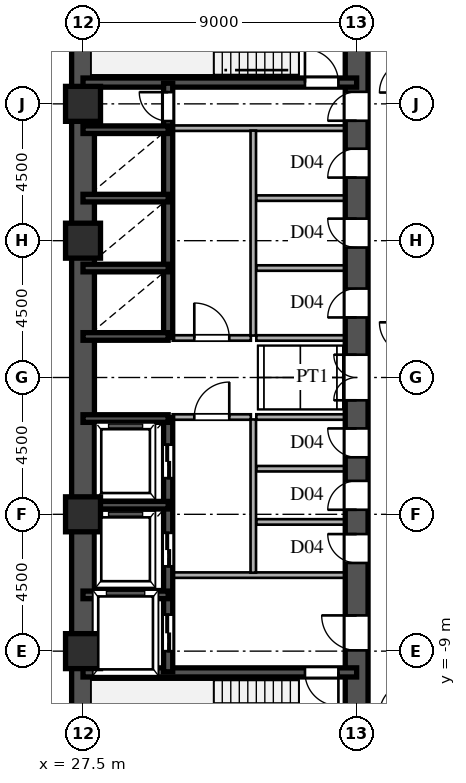
"""IFC4 building model, lengths in metres.
Left out: names, types, materials, properties, quantities, classifications, styles, units other than length and angle.
Written with IfcOpenShell. Run it as: python <this file> out.ifc"""

import sys

from ifc_helpers import new_model, si_unit, direction, frame, frame_2d, origin, origin_2d, place, context, subcontext, project, spatial, rectangle, hollow_rectangle, extrude, source, transform, mapped, element, fill, save


model = new_model("IFC4")
c1 = context("Model", 3, precision=1e-05, world=origin(), true_north=direction((0.0, 1.0)))
c2 = subcontext(c1, "Body", "Model", "MODEL_VIEW")
j1 = project(units=[si_unit("LENGTHUNIT", "METRE"), si_unit("PLANEANGLEUNIT", "RADIAN")], contexts=[c1])
p1 = place(None, origin())
s1 = spatial("IfcSite", under=j1, at=p1, CompositionType="ELEMENT")
p2 = place(p1, origin())
s2 = spatial("IfcBuilding", under=s1, at=p2, CompositionType="ELEMENT")
p3 = place(p2, frame((0.0, 0.0, 58.5)))
s3 = spatial("IfcBuildingStorey", under=s2, at=p3, CompositionType="ELEMENT", Elevation=58.5)
m1 = source(origin(), c2, "Body", "SweptSolid", [
    extrude(hollow_rectangle(XDim=1.15, YDim=1.15, WallThickness=0.048, at=origin_2d()), origin(), (0.0, 0.0, 1.0), 3.6),
])
for number, where, z_axis, x_axis in (
    (1, (27.5, -9.0, 0.0), (0.0, 0.0, 1.0), (1.0, 0.0, 0.0)),
    (2, (27.5, -4.5, 0.0), (0.0, 0.0, 1.0), (1.0, 0.0, 0.0)),
    (3, (27.5, 4.5, 0.0), (0.0, 0.0, 1.0), (1.0, 0.0, 0.0)),
    (4, (27.5, 9.0, 0.0), (0.0, 0.0, 1.0), (1.0, 0.0, 0.0)),
):
    element("IfcColumn", number, at=place(p3, frame(where, z_axis=z_axis, x_axis=x_axis)), inside=s3, PredefinedType="COLUMN", context=c2, shape_type="MappedRepresentation", body=[
        mapped(m1, transform((0.0, 0.0, 0.0), scale=1.0)),
    ])
for number, where, z_axis, x_axis in (
    (5, (27.5, -13.5, 0.0), (0.0, 0.0, 1.0), (0.0, 1.0, 0.0)),
    (6, (27.5, 1.3, 0.0), (0.0, 0.0, 1.0), (0.0, 1.0, 0.0)),
):
    element("IfcWall", number, at=place(p3, frame(where, z_axis=z_axis, x_axis=x_axis)), inside=s3, PredefinedType="SHEAR", context=c2, shape_type="SweptSolid", body=[
        extrude(rectangle(XDim=12.2, YDim=0.75, at=frame_2d((6.1, 0.0))), origin(), (0.0, 0.0, 1.0), 3.38),
    ])
p4 = place(p3, frame((27.5, -1.3, 0.0), z_axis=(0.0, 0.0, 1.0), x_axis=(0.0, 1.0, 0.0)))
e7 = element("IfcWall", 7, at=p4, inside=s3, PredefinedType="SHEAR", context=c2, shape_type="SweptSolid", body=[
    extrude(rectangle(XDim=2.6, YDim=0.75, at=frame_2d((1.3, 0.0))), origin(), (0.0, 0.0, 1.0), 3.38),
])
p5 = place(p3, frame((36.5, -13.65, 0.0), z_axis=(0.0, 0.0, 1.0), x_axis=(0.0, 1.0, 0.0)))
e8 = element("IfcWall", 8, at=p5, inside=s3, PredefinedType="SHEAR", context=c2, shape_type="SweptSolid", body=[
    extrude(rectangle(XDim=7.15, YDim=0.75, at=frame_2d((3.575, 0.0))), origin(), (0.0, 0.0, 1.0), 3.38),
])
p6 = place(p5, frame((4.675, 0.0, 0.0)))
e9 = element("IfcOpeningElement", 9, at=p6, cuts=e8, PredefinedType="OPENING", context=c2, shape_type="SweptSolid", body=[
    extrude(rectangle(XDim=1.15, YDim=2.2, at=frame_2d((0.575, 1.1))), frame((0.0, 0.385, 0.0), z_axis=(0.0, -1.0, 0.0), x_axis=(1.0, 0.0, 0.0)), (0.0, 0.0, 1.0), 0.77),
])
p7 = place(p3, frame((36.5, -1.3, 0.0), z_axis=(0.0, 0.0, 1.0), x_axis=(0.0, 1.0, 0.0)))
e10 = element("IfcWall", 10, at=p7, inside=s3, PredefinedType="SHEAR", context=c2, shape_type="SweptSolid", body=[
    extrude(rectangle(XDim=2.6, YDim=0.75, at=frame_2d((1.3, 0.0))), origin(), (0.0, 0.0, 1.0), 3.38),
])
p8 = place(p7, frame((0.55, 0.0, 0.0)))
e11 = element("IfcOpeningElement", 11, at=p8, cuts=e10, PredefinedType="OPENING", context=c2, shape_type="SweptSolid", body=[
    extrude(rectangle(XDim=1.5, YDim=2.3, at=frame_2d((0.75, 1.15))), frame((0.0, 0.385, 0.0), z_axis=(0.0, -1.0, 0.0), x_axis=(1.0, 0.0, 0.0)), (0.0, 0.0, 1.0), 0.77),
])
p9 = place(p3, frame((36.5, 8.2, 0.0), z_axis=(0.0, 0.0, 1.0), x_axis=(0.0, 1.0, 0.0)))
e12 = element("IfcWall", 12, at=p9, inside=s3, PredefinedType="SHEAR", context=c2, shape_type="SweptSolid", body=[
    extrude(rectangle(XDim=5.45, YDim=0.75, at=frame_2d((2.725, 0.0))), origin(), (0.0, 0.0, 1.0), 3.38),
])
p10 = place(p9, frame((0.245, 0.0, 0.0)))
e13 = element("IfcOpeningElement", 13, at=p10, cuts=e12, PredefinedType="OPENING", context=c2, shape_type="SweptSolid", body=[
    extrude(rectangle(XDim=0.95, YDim=2.15, at=frame_2d((0.475, 1.075))), frame((0.0, 0.385, 0.0), z_axis=(0.0, -1.0, 0.0), x_axis=(1.0, 0.0, 0.0)), (0.0, 0.0, 1.0), 0.77),
])
p11 = place(p3, frame((36.5, -6.5, 0.0), z_axis=(0.0, 0.0, 1.0), x_axis=(0.0, 1.0, 0.0)))
e14 = element("IfcWall", 14, at=p11, inside=s3, PredefinedType="SHEAR", context=c2, shape_type="SweptSolid", body=[
    extrude(rectangle(XDim=1.75, YDim=0.75, at=frame_2d((0.875, 0.0))), origin(), (0.0, 0.0, 1.0), 3.38),
])
p12 = place(p11, frame((0.4, 0.0, 0.0)))
e15 = element("IfcOpeningElement", 15, at=p12, cuts=e14, PredefinedType="OPENING", context=c2, shape_type="SweptSolid", body=[
    extrude(rectangle(XDim=0.95, YDim=2.15, at=frame_2d((0.475, 1.075))), frame((0.0, 0.385, 0.0), z_axis=(0.0, -1.0, 0.0), x_axis=(1.0, 0.0, 0.0)), (0.0, 0.0, 1.0), 0.77),
])
p13 = place(p3, frame((36.5, -4.75, 0.0), z_axis=(0.0, 0.0, 1.0), x_axis=(0.0, 1.0, 0.0)))
e16 = element("IfcWall", 16, at=p13, inside=s3, PredefinedType="SHEAR", context=c2, shape_type="SweptSolid", body=[
    extrude(rectangle(XDim=1.75, YDim=0.75, at=frame_2d((0.875, 0.0))), origin(), (0.0, 0.0, 1.0), 3.38),
])
p14 = place(p13, frame((0.4, 0.0, 0.0)))
e17 = element("IfcOpeningElement", 17, at=p14, cuts=e16, PredefinedType="OPENING", context=c2, shape_type="SweptSolid", body=[
    extrude(rectangle(XDim=0.95, YDim=2.15, at=frame_2d((0.475, 1.075))), frame((0.0, 0.385, 0.0), z_axis=(0.0, -1.0, 0.0), x_axis=(1.0, 0.0, 0.0)), (0.0, 0.0, 1.0), 0.77),
])
p15 = place(p3, frame((36.5, -3.0, 0.0), z_axis=(0.0, 0.0, 1.0), x_axis=(0.0, 1.0, 0.0)))
e18 = element("IfcWall", 18, at=p15, inside=s3, PredefinedType="SHEAR", context=c2, shape_type="SweptSolid", body=[
    extrude(rectangle(XDim=1.7, YDim=0.75, at=frame_2d((0.85, 0.0))), origin(), (0.0, 0.0, 1.0), 3.38),
])
p16 = place(p15, frame((0.375, 0.0, 0.0)))
e19 = element("IfcOpeningElement", 19, at=p16, cuts=e18, PredefinedType="OPENING", context=c2, shape_type="SweptSolid", body=[
    extrude(rectangle(XDim=0.95, YDim=2.15, at=frame_2d((0.475, 1.075))), frame((0.0, 0.385, 0.0), z_axis=(0.0, -1.0, 0.0), x_axis=(1.0, 0.0, 0.0)), (0.0, 0.0, 1.0), 0.77),
])
p17 = place(p3, frame((36.5, 1.3, 0.0), z_axis=(0.0, 0.0, 1.0), x_axis=(0.0, 1.0, 0.0)))
e20 = element("IfcWall", 20, at=p17, inside=s3, PredefinedType="SHEAR", context=c2, shape_type="SweptSolid", body=[
    extrude(rectangle(XDim=2.3, YDim=0.75, at=frame_2d((1.15, 0.0))), origin(), (0.0, 0.0, 1.0), 3.38),
])
p18 = place(p17, frame((0.675, 0.0, 0.0)))
e21 = element("IfcOpeningElement", 21, at=p18, cuts=e20, PredefinedType="OPENING", context=c2, shape_type="SweptSolid", body=[
    extrude(rectangle(XDim=0.95, YDim=2.15, at=frame_2d((0.475, 1.075))), frame((0.0, 0.385, 0.0), z_axis=(0.0, -1.0, 0.0), x_axis=(1.0, 0.0, 0.0)), (0.0, 0.0, 1.0), 0.77),
])
p19 = place(p3, frame((36.5, 3.6, 0.0), z_axis=(0.0, 0.0, 1.0), x_axis=(0.0, 1.0, 0.0)))
e22 = element("IfcWall", 22, at=p19, inside=s3, PredefinedType="SHEAR", context=c2, shape_type="SweptSolid", body=[
    extrude(rectangle(XDim=2.3, YDim=0.75, at=frame_2d((1.15, 0.0))), origin(), (0.0, 0.0, 1.0), 3.38),
])
p20 = place(p19, frame((0.675, 0.0, 0.0)))
e23 = element("IfcOpeningElement", 23, at=p20, cuts=e22, PredefinedType="OPENING", context=c2, shape_type="SweptSolid", body=[
    extrude(rectangle(XDim=0.95, YDim=2.15, at=frame_2d((0.475, 1.075))), frame((0.0, 0.385, 0.0), z_axis=(0.0, -1.0, 0.0), x_axis=(1.0, 0.0, 0.0)), (0.0, 0.0, 1.0), 0.77),
])
p21 = place(p3, frame((36.5, 5.9, 0.0), z_axis=(0.0, 0.0, 1.0), x_axis=(0.0, 1.0, 0.0)))
e24 = element("IfcWall", 24, at=p21, inside=s3, PredefinedType="SHEAR", context=c2, shape_type="SweptSolid", body=[
    extrude(rectangle(XDim=2.3, YDim=0.75, at=frame_2d((1.15, 0.0))), origin(), (0.0, 0.0, 1.0), 3.38),
])
p22 = place(p21, frame((0.675, 0.0, 0.0)))
e25 = element("IfcOpeningElement", 25, at=p22, cuts=e24, PredefinedType="OPENING", context=c2, shape_type="SweptSolid", body=[
    extrude(rectangle(XDim=0.95, YDim=2.15, at=frame_2d((0.475, 1.075))), frame((0.0, 0.385, 0.0), z_axis=(0.0, -1.0, 0.0), x_axis=(1.0, 0.0, 0.0)), (0.0, 0.0, 1.0), 0.77),
])
p23 = place(p3, frame((27.5, -9.7, 0.0), z_axis=(0.0, 0.0, 1.0), x_axis=(1.0, 0.0, 0.0)))
e26 = element("IfcWall", 26, at=p23, inside=s3, PredefinedType="SHEAR", context=c2, shape_type="SweptSolid", body=[
    extrude(rectangle(XDim=9.0, YDim=0.3, at=frame_2d((4.5, 0.0))), origin(), (0.0, 0.0, 1.0), 3.38),
])
p24 = place(p23, frame((7.3, 0.0, 0.0)))
e27 = element("IfcOpeningElement", 27, at=p24, cuts=e26, PredefinedType="OPENING", context=c2, shape_type="SweptSolid", body=[
    extrude(rectangle(XDim=1.1, YDim=2.2, at=frame_2d((0.55, 1.1))), frame((0.0, 0.16, 0.0), z_axis=(0.0, -1.0, 0.0), x_axis=(1.0, 0.0, 0.0)), (0.0, 0.0, 1.0), 0.32),
])
p25 = place(p3, frame((27.5, 9.7, 0.0), z_axis=(0.0, 0.0, 1.0), x_axis=(1.0, 0.0, 0.0)))
e28 = element("IfcWall", 28, at=p25, inside=s3, PredefinedType="SHEAR", context=c2, shape_type="SweptSolid", body=[
    extrude(rectangle(XDim=9.0, YDim=0.3, at=frame_2d((4.5, 0.0))), origin(), (0.0, 0.0, 1.0), 3.38),
])
p26 = place(p25, frame((7.3, 0.0, 0.0)))
e29 = element("IfcOpeningElement", 29, at=p26, cuts=e28, PredefinedType="OPENING", context=c2, shape_type="SweptSolid", body=[
    extrude(rectangle(XDim=1.1, YDim=2.2, at=frame_2d((0.55, 1.1))), frame((0.0, 0.16, 0.0), z_axis=(0.0, -1.0, 0.0), x_axis=(1.0, 0.0, 0.0)), (0.0, 0.0, 1.0), 0.32),
])
for number, where, z_axis, x_axis in (
    (30, (27.5, -7.15, 0.0), (0.0, 0.0, 1.0), (1.0, 0.0, 0.0)),
    (31, (27.5, -4.2, 0.0), (0.0, 0.0, 1.0), (1.0, 0.0, 0.0)),
    (32, (27.5, -1.35, 0.0), (0.0, 0.0, 1.0), (1.0, 0.0, 0.0)),
    (33, (27.5, 1.35, 0.0), (0.0, 0.0, 1.0), (1.0, 0.0, 0.0)),
    (34, (27.5, 3.6, 0.0), (0.0, 0.0, 1.0), (1.0, 0.0, 0.0)),
    (35, (27.5, 5.9, 0.0), (0.0, 0.0, 1.0), (1.0, 0.0, 0.0)),
    (36, (27.5, 8.15, 0.0), (0.0, 0.0, 1.0), (1.0, 0.0, 0.0)),
):
    element("IfcWall", number, at=place(p3, frame(where, z_axis=z_axis, x_axis=x_axis)), inside=s3, PredefinedType="SHEAR", context=c2, shape_type="SweptSolid", body=[
        extrude(rectangle(XDim=2.8, YDim=0.25, at=frame_2d((1.4, 0.0))), origin(), (0.0, 0.0, 1.0), 3.38),
    ])
p27 = place(p3, frame((30.3, -9.68, 0.0), z_axis=(0.0, 0.0, 1.0), x_axis=(0.0, 1.0, 0.0)))
e37 = element("IfcWall", 37, at=p27, inside=s3, PredefinedType="SHEAR", context=c2, shape_type="SweptSolid", body=[
    extrude(rectangle(XDim=2.56, YDim=0.3, at=frame_2d((1.28, 0.0))), origin(), (0.0, 0.0, 1.0), 3.38),
])
p28 = place(p27, frame((0.68, 0.0, 0.0)))
e38 = element("IfcOpeningElement", 38, at=p28, cuts=e37, PredefinedType="OPENING", context=c2, shape_type="SweptSolid", body=[
    extrude(rectangle(XDim=1.2, YDim=2.25, at=frame_2d((0.6, 1.125))), frame((0.0, 0.16, 0.0), z_axis=(0.0, -1.0, 0.0), x_axis=(1.0, 0.0, 0.0)), (0.0, 0.0, 1.0), 0.32),
])
p29 = place(p3, frame((30.3, -7.12, 0.0), z_axis=(0.0, 0.0, 1.0), x_axis=(0.0, 1.0, 0.0)))
e39 = element("IfcWall", 39, at=p29, inside=s3, PredefinedType="SHEAR", context=c2, shape_type="SweptSolid", body=[
    extrude(rectangle(XDim=2.92, YDim=0.3, at=frame_2d((1.46, 0.0))), origin(), (0.0, 0.0, 1.0), 3.38),
])
p30 = place(p29, frame((0.91, 0.0, 0.0)))
e40 = element("IfcOpeningElement", 40, at=p30, cuts=e39, PredefinedType="OPENING", context=c2, shape_type="SweptSolid", body=[
    extrude(rectangle(XDim=1.1, YDim=2.2, at=frame_2d((0.55, 1.1))), frame((0.0, 0.16, 0.0), z_axis=(0.0, -1.0, 0.0), x_axis=(1.0, 0.0, 0.0)), (0.0, 0.0, 1.0), 0.32),
])
p31 = place(p3, frame((30.3, -4.2, 0.0), z_axis=(0.0, 0.0, 1.0), x_axis=(0.0, 1.0, 0.0)))
e41 = element("IfcWall", 41, at=p31, inside=s3, PredefinedType="SHEAR", context=c2, shape_type="SweptSolid", body=[
    extrude(rectangle(XDim=2.88, YDim=0.3, at=frame_2d((1.44, 0.0))), origin(), (0.0, 0.0, 1.0), 3.38),
])
p32 = place(p31, frame((0.89, 0.0, 0.0)))
e42 = element("IfcOpeningElement", 42, at=p32, cuts=e41, PredefinedType="OPENING", context=c2, shape_type="SweptSolid", body=[
    extrude(rectangle(XDim=1.1, YDim=2.2, at=frame_2d((0.55, 1.1))), frame((0.0, 0.16, 0.0), z_axis=(0.0, -1.0, 0.0), x_axis=(1.0, 0.0, 0.0)), (0.0, 0.0, 1.0), 0.32),
])
p33 = place(p3, frame((30.3, 1.32, 0.0), z_axis=(0.0, 0.0, 1.0), x_axis=(0.0, 1.0, 0.0)))
e43 = element("IfcWall", 43, at=p33, inside=s3, PredefinedType="SHEAR", context=c2, shape_type="SweptSolid", body=[
    extrude(rectangle(XDim=2.28, YDim=0.3, at=frame_2d((1.14, 0.0))), origin(), (0.0, 0.0, 1.0), 3.38),
])
p34 = place(p3, frame((30.3, 3.6, 0.0), z_axis=(0.0, 0.0, 1.0), x_axis=(0.0, 1.0, 0.0)))
e44 = element("IfcWall", 44, at=p34, inside=s3, PredefinedType="SHEAR", context=c2, shape_type="SweptSolid", body=[
    extrude(rectangle(XDim=2.3, YDim=0.3, at=frame_2d((1.15, 0.0))), origin(), (0.0, 0.0, 1.0), 3.38),
])
p35 = place(p3, frame((30.3, 5.9, 0.0), z_axis=(0.0, 0.0, 1.0), x_axis=(0.0, 1.0, 0.0)))
e45 = element("IfcWall", 45, at=p35, inside=s3, PredefinedType="SHEAR", context=c2, shape_type="SweptSolid", body=[
    extrude(rectangle(XDim=2.25, YDim=0.3, at=frame_2d((1.125, 0.0))), origin(), (0.0, 0.0, 1.0), 3.38),
])
p36 = place(p3, frame((30.3, 8.15, 0.0), z_axis=(0.0, 0.0, 1.0), x_axis=(0.0, 1.0, 0.0)))
e46 = element("IfcWall", 46, at=p36, inside=s3, PredefinedType="SHEAR", context=c2, shape_type="SweptSolid", body=[
    extrude(rectangle(XDim=1.53, YDim=0.3, at=frame_2d((0.765, 0.0))), origin(), (0.0, 0.0, 1.0), 3.38),
])
p37 = place(p36, frame((0.285, 0.0, 0.0)))
e47 = element("IfcOpeningElement", 47, at=p37, cuts=e46, PredefinedType="OPENING", context=c2, shape_type="SweptSolid", body=[
    extrude(rectangle(XDim=0.95, YDim=2.15, at=frame_2d((0.475, 1.075))), frame((0.0, 0.16, 0.0), z_axis=(0.0, -1.0, 0.0), x_axis=(1.0, 0.0, 0.0)), (0.0, 0.0, 1.0), 0.32),
])
for number, where, z_axis, x_axis in (
    (48, (30.45, -6.5, 0.0), (0.0, 0.0, 1.0), (1.0, 0.0, 0.0)),
    (49, (30.45, 8.2, 0.0), (0.0, 0.0, 1.0), (1.0, 0.0, 0.0)),
):
    element("IfcWall", number, at=place(p3, frame(where, z_axis=z_axis, x_axis=x_axis)), inside=s3, PredefinedType="PARTITIONING", context=c2, shape_type="SweptSolid", body=[
        extrude(rectangle(XDim=5.7, YDim=0.18, at=frame_2d((2.85, 0.0))), origin(), (0.0, 0.0, 1.0), 3.38),
    ])
p38 = place(p3, frame((33.1, -6.42, 0.0), z_axis=(0.0, 0.0, 1.0), x_axis=(0.0, 1.0, 0.0)))
e50 = element("IfcWall", 50, at=p38, inside=s3, PredefinedType="PARTITIONING", context=c2, shape_type="SweptSolid", body=[
    extrude(rectangle(XDim=5.04, YDim=0.18, at=frame_2d((2.52, 0.0))), origin(), (0.0, 0.0, 1.0), 3.38),
])
p39 = place(p3, frame((33.1, 1.38, 0.0), z_axis=(0.0, 0.0, 1.0), x_axis=(0.0, 1.0, 0.0)))
e51 = element("IfcWall", 51, at=p39, inside=s3, PredefinedType="PARTITIONING", context=c2, shape_type="SweptSolid", body=[
    extrude(rectangle(XDim=6.74, YDim=0.18, at=frame_2d((3.37, 0.0))), origin(), (0.0, 0.0, 1.0), 3.38),
])
p40 = place(p3, frame((30.45, -1.3, 0.0), z_axis=(0.0, 0.0, 1.0), x_axis=(1.0, 0.0, 0.0)))
e52 = element("IfcWall", 52, at=p40, inside=s3, PredefinedType="PARTITIONING", context=c2, shape_type="SweptSolid", body=[
    extrude(rectangle(XDim=2.57, YDim=0.18, at=frame_2d((1.285, 0.0))), origin(), (0.0, 0.0, 1.0), 3.38),
])
p41 = place(p40, frame((0.71, 0.0, 0.0)))
e53 = element("IfcOpeningElement", 53, at=p41, cuts=e52, PredefinedType="OPENING", context=c2, shape_type="SweptSolid", body=[
    extrude(rectangle(XDim=1.15, YDim=2.2, at=frame_2d((0.575, 1.1))), frame((0.0, 0.1, 0.0), z_axis=(0.0, -1.0, 0.0), x_axis=(1.0, 0.0, 0.0)), (0.0, 0.0, 1.0), 0.2),
])
p42 = place(p3, frame((30.45, 1.3, 0.0), z_axis=(0.0, 0.0, 1.0), x_axis=(1.0, 0.0, 0.0)))
e54 = element("IfcWall", 54, at=p42, inside=s3, PredefinedType="PARTITIONING", context=c2, shape_type="SweptSolid", body=[
    extrude(rectangle(XDim=2.57, YDim=0.18, at=frame_2d((1.285, 0.0))), origin(), (0.0, 0.0, 1.0), 3.38),
])
p43 = place(p42, frame((0.71, 0.0, 0.0)))
e55 = element("IfcOpeningElement", 55, at=p43, cuts=e54, PredefinedType="OPENING", context=c2, shape_type="SweptSolid", body=[
    extrude(rectangle(XDim=1.15, YDim=2.2, at=frame_2d((0.575, 1.1))), frame((0.0, 0.1, 0.0), z_axis=(0.0, -1.0, 0.0), x_axis=(1.0, 0.0, 0.0)), (0.0, 0.0, 1.0), 0.2),
])
for number, where, z_axis, x_axis in (
    (56, (33.2, -1.3, 0.0), (0.0, 0.0, 1.0), (1.0, 0.0, 0.0)),
    (57, (33.2, 1.3, 0.0), (0.0, 0.0, 1.0), (1.0, 0.0, 0.0)),
    (58, (33.2, -4.75, 0.0), (0.0, 0.0, 1.0), (1.0, 0.0, 0.0)),
    (59, (33.2, -3.0, 0.0), (0.0, 0.0, 1.0), (1.0, 0.0, 0.0)),
    (60, (33.2, 3.6, 0.0), (0.0, 0.0, 1.0), (1.0, 0.0, 0.0)),
    (61, (33.2, 5.9, 0.0), (0.0, 0.0, 1.0), (1.0, 0.0, 0.0)),
):
    element("IfcWall", number, at=place(p3, frame(where, z_axis=z_axis, x_axis=x_axis)), inside=s3, PredefinedType="PARTITIONING", context=c2, shape_type="SweptSolid", body=[
        extrude(rectangle(XDim=2.95, YDim=0.18, at=frame_2d((1.475, 0.0))), origin(), (0.0, 0.0, 1.0), 3.38),
    ])
m2 = source(origin(), c2, "Body", "SweptSolid", [
    extrude(rectangle(XDim=1.15, YDim=2.2, at=frame_2d((0.575, 1.1))), frame((0.0, 0.025, 0.0), z_axis=(0.0, -1.0, 0.0), x_axis=(1.0, 0.0, 0.0)), (0.0, 0.0, 1.0), 0.05),
])
p44 = place(p6, origin())
e62 = element("IfcDoor", 62, at=p44, inside=s3, OperationType="SINGLE_SWING_RIGHT", PredefinedType="DOOR", context=c2, shape_type="MappedRepresentation", body=[
    mapped(m2, transform((0.0, 0.0, 0.0), scale=1.0)),
])
fill(e9, e62)
m3 = source(origin(), c2, "Body", "SweptSolid", [
    extrude(rectangle(XDim=1.5, YDim=2.3, at=frame_2d((0.75, 1.15))), frame((0.0, 0.025, 0.0), z_axis=(0.0, -1.0, 0.0), x_axis=(1.0, 0.0, 0.0)), (0.0, 0.0, 1.0), 0.05),
])
p45 = place(p8, origin())
e63 = element("IfcDoor", 63, at=p45, inside=s3, OperationType="DOUBLE_SWING_LEFT", PredefinedType="DOOR", context=c2, shape_type="MappedRepresentation", body=[
    mapped(m3, transform((0.0, 0.0, 0.0), scale=1.0)),
])
fill(e11, e63)
m4 = source(origin(), c2, "Body", "SweptSolid", [
    extrude(rectangle(XDim=0.95, YDim=2.15, at=frame_2d((0.475, 1.075))), frame((0.0, 0.025, 0.0), z_axis=(0.0, -1.0, 0.0), x_axis=(1.0, 0.0, 0.0)), (0.0, 0.0, 1.0), 0.05),
])
p46 = place(p10, origin())
e64 = element("IfcDoor", 64, at=p46, inside=s3, OperationType="SINGLE_SWING_LEFT", PredefinedType="DOOR", context=c2, shape_type="MappedRepresentation", body=[
    mapped(m4, transform((0.0, 0.0, 0.0), scale=1.0)),
])
fill(e13, e64)
p47 = place(p12, origin())
e65 = element("IfcDoor", 65, at=p47, inside=s3, OperationType="SINGLE_SWING_RIGHT", PredefinedType="DOOR", context=c2, shape_type="MappedRepresentation", body=[
    mapped(m4, transform((0.0, 0.0, 0.0), scale=1.0)),
])
fill(e15, e65)
p48 = place(p14, origin())
e66 = element("IfcDoor", 66, at=p48, inside=s3, OperationType="SINGLE_SWING_LEFT", PredefinedType="DOOR", context=c2, shape_type="MappedRepresentation", body=[
    mapped(m4, transform((0.0, 0.0, 0.0), scale=1.0)),
])
fill(e17, e66)
p49 = place(p16, origin())
e67 = element("IfcDoor", 67, at=p49, inside=s3, OperationType="SINGLE_SWING_RIGHT", PredefinedType="DOOR", context=c2, shape_type="MappedRepresentation", body=[
    mapped(m4, transform((0.0, 0.0, 0.0), scale=1.0)),
])
fill(e19, e67)
p50 = place(p18, origin())
e68 = element("IfcDoor", 68, at=p50, inside=s3, OperationType="SINGLE_SWING_LEFT", PredefinedType="DOOR", context=c2, shape_type="MappedRepresentation", body=[
    mapped(m4, transform((0.0, 0.0, 0.0), scale=1.0)),
])
fill(e21, e68)
p51 = place(p20, origin())
e69 = element("IfcDoor", 69, at=p51, inside=s3, OperationType="SINGLE_SWING_RIGHT", PredefinedType="DOOR", context=c2, shape_type="MappedRepresentation", body=[
    mapped(m4, transform((0.0, 0.0, 0.0), scale=1.0)),
])
fill(e23, e69)
p52 = place(p22, origin())
e70 = element("IfcDoor", 70, at=p52, inside=s3, OperationType="SINGLE_SWING_LEFT", PredefinedType="DOOR", context=c2, shape_type="MappedRepresentation", body=[
    mapped(m4, transform((0.0, 0.0, 0.0), scale=1.0)),
])
fill(e25, e70)
m5 = source(origin(), c2, "Body", "SweptSolid", [
    extrude(rectangle(XDim=1.1, YDim=2.2, at=frame_2d((0.55, 1.1))), frame((0.0, 0.025, 0.0), z_axis=(0.0, -1.0, 0.0), x_axis=(1.0, 0.0, 0.0)), (0.0, 0.0, 1.0), 0.05),
])
p53 = place(p24, frame((1.1, 0.0, 0.0), z_axis=(0.0, 0.0, 1.0), x_axis=(-1.0, 0.0, 0.0)))
e71 = element("IfcDoor", 71, at=p53, inside=s3, OperationType="SINGLE_SWING_RIGHT", PredefinedType="DOOR", context=c2, shape_type="MappedRepresentation", body=[
    mapped(m5, transform((0.0, 0.0, 0.0), scale=1.0)),
])
fill(e27, e71)
p54 = place(p26, origin())
e72 = element("IfcDoor", 72, at=p54, inside=s3, OperationType="SINGLE_SWING_LEFT", PredefinedType="DOOR", context=c2, shape_type="MappedRepresentation", body=[
    mapped(m5, transform((0.0, 0.0, 0.0), scale=1.0)),
])
fill(e29, e72)
m6 = source(origin(), c2, "Body", "SweptSolid", [
    extrude(rectangle(XDim=1.2, YDim=2.25, at=frame_2d((0.6, 1.125))), frame((0.0, 0.025, 0.0), z_axis=(0.0, -1.0, 0.0), x_axis=(1.0, 0.0, 0.0)), (0.0, 0.0, 1.0), 0.05),
])
p55 = place(p28, origin())
e73 = element("IfcDoor", 73, at=p55, inside=s3, OperationType="DOUBLE_DOOR_SLIDING", PredefinedType="DOOR", context=c2, shape_type="MappedRepresentation", body=[
    mapped(m6, transform((0.0, 0.0, 0.0), scale=1.0)),
])
fill(e38, e73)
m7 = source(origin(), c2, "Body", "SweptSolid", [
    extrude(rectangle(XDim=1.1, YDim=2.2, at=frame_2d((0.55, 1.1))), frame((0.0, 0.025, 0.0), z_axis=(0.0, -1.0, 0.0), x_axis=(1.0, 0.0, 0.0)), (0.0, 0.0, 1.0), 0.05),
])
p56 = place(p30, origin())
e74 = element("IfcDoor", 74, at=p56, inside=s3, OperationType="DOUBLE_DOOR_SLIDING", PredefinedType="DOOR", context=c2, shape_type="MappedRepresentation", body=[
    mapped(m7, transform((0.0, 0.0, 0.0), scale=1.0)),
])
fill(e40, e74)
p57 = place(p32, origin())
e75 = element("IfcDoor", 75, at=p57, inside=s3, OperationType="DOUBLE_DOOR_SLIDING", PredefinedType="DOOR", context=c2, shape_type="MappedRepresentation", body=[
    mapped(m7, transform((0.0, 0.0, 0.0), scale=1.0)),
])
fill(e42, e75)
p58 = place(p37, origin())
e76 = element("IfcDoor", 76, at=p58, inside=s3, OperationType="SINGLE_SWING_RIGHT", PredefinedType="DOOR", context=c2, shape_type="MappedRepresentation", body=[
    mapped(m4, transform((0.0, 0.0, 0.0), scale=1.0)),
])
fill(e47, e76)
p59 = place(p41, origin())
e77 = element("IfcDoor", 77, at=p59, inside=s3, OperationType="SINGLE_SWING_RIGHT", PredefinedType="DOOR", context=c2, shape_type="MappedRepresentation", body=[
    mapped(m2, transform((0.0, 0.0, 0.0), scale=1.0)),
])
fill(e53, e77)
p60 = place(p43, origin())
e78 = element("IfcDoor", 78, at=p60, inside=s3, OperationType="SINGLE_SWING_LEFT", PredefinedType="DOOR", context=c2, shape_type="MappedRepresentation", body=[
    mapped(m2, transform((0.0, 0.0, 0.0), scale=1.0)),
])
fill(e55, e78)
save(model, sys.argv[1])
